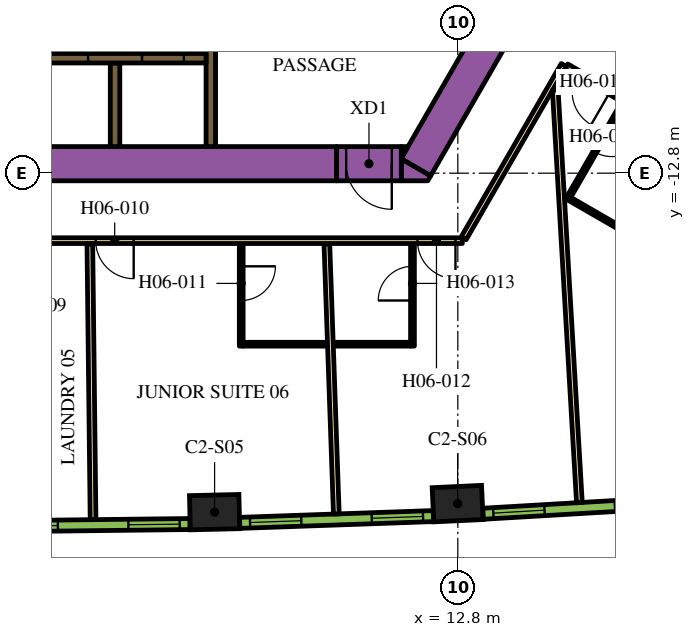
"""IFC4 building model, lengths in metres.
Left out: names, types, materials, properties, quantities, classifications, styles, units other than length and angle.
Written with IfcOpenShell. Run it as: python <this file> out.ifc"""

import sys

from ifc_helpers import new_model, si_unit, direction, frame, frame_2d, origin, origin_2d, place, context, subcontext, project, spatial, polyline, rectangle, outline, extrude, element, fill, save


model = new_model("IFC4")
c1 = context("Model", 3, precision=1e-05, world=origin(), true_north=direction((0.0, 1.0)))
c2 = subcontext(c1, "Body", "Model", "MODEL_VIEW")
j1 = project(units=[si_unit("LENGTHUNIT", "METRE"), si_unit("PLANEANGLEUNIT", "RADIAN")], contexts=[c1])
p1 = place(None, origin())
s1 = spatial("IfcSite", under=j1, at=p1, CompositionType="ELEMENT")
p2 = place(p1, origin())
s2 = spatial("IfcBuilding", under=s1, at=p2, CompositionType="ELEMENT")
p3 = place(p2, frame((0.0, 0.0, 87.6)))
s3 = spatial("IfcBuildingStorey", under=s2, at=p3, CompositionType="ELEMENT", Elevation=87.6)
for number, where, z_axis, x_axis in (
    (1, (6.399, -21.719, 0.0), (0.0, 0.0, 1.0), (1.0, 0.023, 0.0)),
    (2, (12.795, -21.494, 0.0), (0.0, 0.0, 1.0), (0.999, 0.047, 0.0)),
):
    element("IfcColumn", number, at=place(p3, frame(where, z_axis=z_axis, x_axis=x_axis)), inside=s3, PredefinedType="COLUMN", context=c2, shape_type="SweptSolid", body=[
        extrude(rectangle(XDim=1.3, YDim=0.9, at=origin_2d()), origin(), (0.0, 0.0, 1.0), 3.9),
    ])
p4 = place(p3, frame((11.695, -12.644, 0.0), z_axis=(0.0, 0.0, 1.0), x_axis=(0.500010229568, 0.86601949766, 0.0)))
e3 = element("IfcWall", 3, at=p4, inside=s3, PredefinedType="SOLIDWALL", context=c2, shape_type="SweptSolid", body=[
    extrude(rectangle(XDim=9.326, YDim=0.9, at=frame_2d((4.663, 0.0))), origin(), (0.0, 0.0, 1.0), 3.9),
])
p5 = place(p3, origin())
e4 = element("IfcWall", 4, at=p5, inside=s3, PredefinedType="SOLIDWALL", context=c2, shape_type="SweptSolid", body=[
    extrude(outline(polyline([(12.009, -13.0), (11.312, -13.0), (11.312, -12.425), (12.083, -12.871), (12.009, -13.0)])), origin(), (0.0, 0.0, 1.0), 3.9),
])
e5 = element("IfcWall", 5, at=p5, inside=s3, PredefinedType="SOLIDWALL", context=c2, shape_type="SweptSolid", body=[
    extrude(outline(polyline([(11.489, -12.1), (11.312, -12.407), (11.312, -12.1), (11.489, -12.1)])), origin(), (0.0, 0.0, 1.0), 3.9),
])
p6 = place(p3, frame((-12.019, -12.55, 0.0), z_axis=(0.0, 0.0, 1.0), x_axis=(1.0, 0.0, 0.0)))
e6 = element("IfcWall", 6, at=p6, inside=s3, PredefinedType="SOLIDWALL", context=c2, shape_type="SweptSolid", body=[
    extrude(rectangle(XDim=21.63, YDim=0.9, at=frame_2d((10.815, 0.0))), origin(), (0.0, 0.0, 1.0), 3.9),
])
p7 = place(p3, frame((6.3, -8.67, 0.0), z_axis=(0.0, 0.0, 1.0), x_axis=(0.0, -1.0, 0.0)))
e7 = element("IfcWall", 7, at=p7, inside=s3, PredefinedType="SOLIDWALL", context=c2, shape_type="SweptSolid", body=[
    extrude(rectangle(XDim=3.43, YDim=0.25, at=frame_2d((1.715, 0.0))), origin(), (0.0, 0.0, 1.0), 3.9),
])
p8 = place(p3, frame((3.78, -12.1, 0.0), z_axis=(0.0, 0.0, 1.0), x_axis=(0.0, 1.0, 0.0)))
e8 = element("IfcWall", 8, at=p8, inside=s3, PredefinedType="SOLIDWALL", context=c2, shape_type="SweptSolid", body=[
    extrude(rectangle(XDim=2.2, YDim=0.25, at=frame_2d((1.1, 0.0))), origin(), (0.0, 0.0, 1.0), 3.9),
])
p9 = place(p3, frame((-6.175, -9.775, 0.0), z_axis=(0.0, 0.0, 1.0), x_axis=(1.0, 0.0, 0.0)))
e9 = element("IfcWall", 9, at=p9, inside=s3, PredefinedType="SOLIDWALL", context=c2, shape_type="SweptSolid", body=[
    extrude(rectangle(XDim=12.35, YDim=0.25, at=frame_2d((6.175, 0.0))), origin(), (0.0, 0.0, 1.0), 3.9),
])
p10 = place(p9, frame((0.585, 0.0, 0.0)))
e10 = element("IfcOpeningElement", 10, at=p10, cuts=e9, PredefinedType="OPENING", context=c2, shape_type="SweptSolid", body=[
    extrude(rectangle(XDim=1.1, YDim=2.1, at=frame_2d((0.55, 1.05))), frame((0.0, 0.135, 0.0), z_axis=(0.0, -1.0, 0.0), x_axis=(1.0, 0.0, 0.0)), (0.0, 0.0, 1.0), 0.27),
])
p11 = place(p9, frame((3.105, 0.0, 0.0)))
e11 = element("IfcOpeningElement", 11, at=p11, cuts=e9, PredefinedType="OPENING", context=c2, shape_type="SweptSolid", body=[
    extrude(rectangle(XDim=1.1, YDim=2.1, at=frame_2d((0.55, 1.05))), frame((0.0, 0.135, 0.0), z_axis=(0.0, -1.0, 0.0), x_axis=(1.0, 0.0, 0.0)), (0.0, 0.0, 1.0), 0.27),
])
p12 = place(p9, frame((5.625, 0.0, 0.0)))
e12 = element("IfcOpeningElement", 12, at=p12, cuts=e9, PredefinedType="OPENING", context=c2, shape_type="SweptSolid", body=[
    extrude(rectangle(XDim=1.1, YDim=2.1, at=frame_2d((0.55, 1.05))), frame((0.0, 0.135, 0.0), z_axis=(0.0, -1.0, 0.0), x_axis=(1.0, 0.0, 0.0)), (0.0, 0.0, 1.0), 0.27),
])
p13 = place(p9, frame((8.145, 0.0, 0.0)))
e13 = element("IfcOpeningElement", 13, at=p13, cuts=e9, PredefinedType="OPENING", context=c2, shape_type="SweptSolid", body=[
    extrude(rectangle(XDim=1.1, YDim=2.1, at=frame_2d((0.55, 1.05))), frame((0.0, 0.135, 0.0), z_axis=(0.0, -1.0, 0.0), x_axis=(1.0, 0.0, 0.0)), (0.0, 0.0, 1.0), 0.27),
])
p14 = place(p9, frame((10.665, 0.0, 0.0)))
e14 = element("IfcOpeningElement", 14, at=p14, cuts=e9, PredefinedType="OPENING", context=c2, shape_type="SweptSolid", body=[
    extrude(rectangle(XDim=1.1, YDim=2.1, at=frame_2d((0.55, 1.05))), frame((0.0, 0.135, 0.0), z_axis=(0.0, -1.0, 0.0), x_axis=(1.0, 0.0, 0.0)), (0.0, 0.0, 1.0), 0.27),
])
p15 = place(p3, frame((11.312, -12.55, 0.0), z_axis=(0.0, 0.0, 1.0), x_axis=(-1.0, 0.0, 0.0)))
e15 = element("IfcWall", 15, at=p15, inside=s3, PredefinedType="SOLIDWALL", context=c2, shape_type="SweptSolid", body=[
    extrude(rectangle(XDim=1.7, YDim=0.9, at=frame_2d((0.85, 0.0))), origin(), (0.0, 0.0, 1.0), 3.9),
])
p16 = place(p15, frame((0.25, 0.0, 0.0)))
e16 = element("IfcOpeningElement", 16, at=p16, cuts=e15, PredefinedType="OPENING", context=c2, shape_type="SweptSolid", body=[
    extrude(rectangle(XDim=1.2, YDim=2.1, at=frame_2d((0.6, 1.05))), frame((0.0, 0.46, 0.0), z_axis=(0.0, -1.0, 0.0), x_axis=(1.0, 0.0, 0.0)), (0.0, 0.0, 1.0), 0.92),
])
p17 = place(p3, frame((16.412, -8.523, 0.0), z_axis=(0.0, 0.0, 1.0), x_axis=(0.866025629663, -0.499999608766, 0.0)))
e17 = element("IfcWall", 17, at=p17, inside=s3, PredefinedType="PARTITIONING", context=c2, shape_type="SweptSolid", body=[
    extrude(rectangle(XDim=13.624, YDim=0.15, at=frame_2d((6.812, 0.0))), origin(), (0.0, 0.0, 1.0), 2.75),
])
p18 = place(p17, frame((4.134, 0.0, 0.0)))
e18 = element("IfcOpeningElement", 18, at=p18, cuts=e17, PredefinedType="OPENING", context=c2, shape_type="SweptSolid", body=[
    extrude(rectangle(XDim=1.0, YDim=2.1, at=frame_2d((0.5, 1.05))), frame((0.0, 0.085, 0.0), z_axis=(0.0, -1.0, 0.0), x_axis=(1.0, 0.0, 0.0)), (0.0, 0.0, 1.0), 0.17),
])
p19 = place(p3, frame((12.918, -14.575, 0.0), z_axis=(0.0, 0.0, 1.0), x_axis=(-1.0, 0.0, 0.0)))
e19 = element("IfcWall", 19, at=p19, inside=s3, PredefinedType="PARTITIONING", context=c2, shape_type="SweptSolid", body=[
    extrude(rectangle(XDim=25.766, YDim=0.15, at=frame_2d((12.883, 0.0))), origin(), (0.0, 0.0, 1.0), 2.75),
])
p20 = place(p19, frame((19.306, 0.0, 0.0)))
e20 = element("IfcOpeningElement", 20, at=p20, cuts=e19, PredefinedType="OPENING", context=c2, shape_type="SweptSolid", body=[
    extrude(rectangle(XDim=1.0, YDim=2.1, at=frame_2d((0.5, 1.05))), frame((0.0, 0.085, 0.0), z_axis=(0.0, -1.0, 0.0), x_axis=(1.0, 0.0, 0.0)), (0.0, 0.0, 1.0), 0.17),
])
p21 = place(p19, frame((17.999, 0.0, 0.0)))
e21 = element("IfcOpeningElement", 21, at=p21, cuts=e19, PredefinedType="OPENING", context=c2, shape_type="SweptSolid", body=[
    extrude(rectangle(XDim=1.0, YDim=2.1, at=frame_2d((0.5, 1.05))), frame((0.0, 0.085, 0.0), z_axis=(0.0, -1.0, 0.0), x_axis=(1.0, 0.0, 0.0)), (0.0, 0.0, 1.0), 0.17),
])
p22 = place(p19, frame((10.874, 0.0, 0.0)))
e22 = element("IfcOpeningElement", 22, at=p22, cuts=e19, PredefinedType="OPENING", context=c2, shape_type="SweptSolid", body=[
    extrude(rectangle(XDim=0.9, YDim=2.1, at=frame_2d((0.45, 1.05))), frame((0.0, 0.085, 0.0), z_axis=(0.0, -1.0, 0.0), x_axis=(1.0, 0.0, 0.0)), (0.0, 0.0, 1.0), 0.17),
])
p23 = place(p19, frame((8.647, 0.0, 0.0)))
e23 = element("IfcOpeningElement", 23, at=p23, cuts=e19, PredefinedType="OPENING", context=c2, shape_type="SweptSolid", body=[
    extrude(rectangle(XDim=1.0, YDim=2.1, at=frame_2d((0.5, 1.05))), frame((0.0, 0.085, 0.0), z_axis=(0.0, -1.0, 0.0), x_axis=(1.0, 0.0, 0.0)), (0.0, 0.0, 1.0), 0.17),
])
p24 = place(p19, frame((0.18, 0.0, 0.0)))
e24 = element("IfcOpeningElement", 24, at=p24, cuts=e19, PredefinedType="OPENING", context=c2, shape_type="SweptSolid", body=[
    extrude(rectangle(XDim=1.0, YDim=2.1, at=frame_2d((0.5, 1.05))), frame((0.0, 0.085, 0.0), z_axis=(0.0, -1.0, 0.0), x_axis=(1.0, 0.0, 0.0)), (0.0, 0.0, 1.0), 0.17),
])
p25 = place(p3, frame((15.587, -9.952, 0.0), z_axis=(0.0, 0.0, 1.0), x_axis=(-0.500016618951, -0.866015808616, 0.0)))
e25 = element("IfcWall", 25, at=p25, inside=s3, PredefinedType="PARTITIONING", context=c2, shape_type="SweptSolid", body=[
    extrude(rectangle(XDim=5.268, YDim=0.15, at=frame_2d((2.634, 0.0))), origin(), (0.0, 0.0, 1.0), 2.75),
])
p26 = place(p3, frame((27.386, -16.764, 0.0), z_axis=(0.0, 0.0, 1.0), x_axis=(-0.866022585856, 0.500004880763, 0.0)))
e26 = element("IfcWall", 26, at=p26, inside=s3, PredefinedType="PARTITIONING", context=c2, shape_type="SweptSolid", body=[
    extrude(rectangle(XDim=13.544, YDim=0.15, at=frame_2d((6.772, 0.0))), origin(), (0.0, 0.0, 1.0), 2.75),
])
p27 = place(p26, frame((12.214, 0.0, 0.0)))
e27 = element("IfcOpeningElement", 27, at=p27, cuts=e26, PredefinedType="OPENING", context=c2, shape_type="SweptSolid", body=[
    extrude(rectangle(XDim=1.0, YDim=2.1, at=frame_2d((0.5, 1.05))), frame((0.0, 0.085, 0.0), z_axis=(0.0, -1.0, 0.0), x_axis=(1.0, 0.0, 0.0)), (0.0, 0.0, 1.0), 0.17),
])
p28 = place(p26, frame((8.49, 0.0, 0.0)))
e28 = element("IfcOpeningElement", 28, at=p28, cuts=e26, PredefinedType="OPENING", context=c2, shape_type="SweptSolid", body=[
    extrude(rectangle(XDim=1.0, YDim=2.1, at=frame_2d((0.5, 1.05))), frame((0.0, 0.085, 0.0), z_axis=(0.0, -1.0, 0.0), x_axis=(1.0, 0.0, 0.0)), (0.0, 0.0, 1.0), 0.17),
])
p29 = place(p3, frame((3.202, -21.916, 0.0), z_axis=(0.0, 0.0, 1.0), x_axis=(-0.011707696285, 0.999931462575, 0.0)))
e29 = element("IfcWall", 29, at=p29, inside=s3, PredefinedType="PARTITIONING", context=c2, shape_type="SweptSolid", body=[
    extrude(rectangle(XDim=7.257, YDim=0.15, at=frame_2d((3.628, 0.0))), origin(), (0.0, 0.0, 1.0), 2.75),
])
p30 = place(p3, frame((9.603, -21.767, 0.0), z_axis=(0.0, 0.0, 1.0), x_axis=(-0.035053506859, 0.999385436985, 0.0)))
e30 = element("IfcWall", 30, at=p30, inside=s3, PredefinedType="PARTITIONING", context=c2, shape_type="SweptSolid", body=[
    extrude(rectangle(XDim=7.111, YDim=0.15, at=frame_2d((3.556, 0.0))), origin(), (0.0, 0.0, 1.0), 2.75),
])
p31 = place(p3, frame((15.999, -21.467, 0.0), z_axis=(0.0, 0.0, 1.0), x_axis=(-0.058433825336, 0.998291284173, 0.0)))
e31 = element("IfcWall", 31, at=p31, inside=s3, PredefinedType="PARTITIONING", context=c2, shape_type="SweptSolid", body=[
    extrude(rectangle(XDim=10.875, YDim=0.15, at=frame_2d((5.438, 0.0))), origin(), (0.0, 0.0, 1.0), 2.75),
])
p32 = place(p3, frame((7.1, -14.65, 0.0), z_axis=(0.0, 0.0, 1.0), x_axis=(0.0, -1.0, 0.0)))
e32 = element("IfcWall", 32, at=p32, inside=s3, PredefinedType="PARTITIONING", context=c2, shape_type="SweptSolid", body=[
    extrude(rectangle(XDim=2.7, YDim=0.1, at=frame_2d((1.35, 0.0))), origin(), (0.0, 0.0, 1.0), 2.75),
])
p33 = place(p32, frame((0.6, 0.0, 0.0)))
e33 = element("IfcOpeningElement", 33, at=p33, cuts=e32, PredefinedType="OPENING", context=c2, shape_type="SweptSolid", body=[
    extrude(rectangle(XDim=0.9, YDim=2.1, at=frame_2d((0.45, 1.05))), frame((0.0, 0.06, 0.0), z_axis=(0.0, -1.0, 0.0), x_axis=(1.0, 0.0, 0.0)), (0.0, 0.0, 1.0), 0.12),
])
p34 = place(p3, frame((7.15, -17.3, 0.0), z_axis=(0.0, 0.0, 1.0), x_axis=(1.0, 0.0, 0.0)))
e34 = element("IfcWall", 34, at=p34, inside=s3, PredefinedType="PARTITIONING", context=c2, shape_type="SweptSolid", body=[
    extrude(rectangle(XDim=2.22, YDim=0.1, at=frame_2d((1.11, 0.0))), origin(), (0.0, 0.0, 1.0), 2.75),
])
p35 = place(p3, frame((11.607, -17.35, 0.0), z_axis=(0.0, 0.0, 1.0), x_axis=(0.0, 1.0, 0.0)))
e35 = element("IfcWall", 35, at=p35, inside=s3, PredefinedType="PARTITIONING", context=c2, shape_type="SweptSolid", body=[
    extrude(rectangle(XDim=2.7, YDim=0.1, at=frame_2d((1.35, 0.0))), origin(), (0.0, 0.0, 1.0), 2.75),
])
p36 = place(p35, frame((1.2, 0.0, 0.0)))
e36 = element("IfcOpeningElement", 36, at=p36, cuts=e35, PredefinedType="OPENING", context=c2, shape_type="SweptSolid", body=[
    extrude(rectangle(XDim=0.9, YDim=2.1, at=frame_2d((0.45, 1.05))), frame((0.0, 0.06, 0.0), z_axis=(0.0, -1.0, 0.0), x_axis=(1.0, 0.0, 0.0)), (0.0, 0.0, 1.0), 0.12),
])
p37 = place(p3, frame((11.557, -17.3, 0.0), z_axis=(0.0, 0.0, 1.0), x_axis=(-1.0, 0.0, 0.0)))
e37 = element("IfcWall", 37, at=p37, inside=s3, PredefinedType="PARTITIONING", context=c2, shape_type="SweptSolid", body=[
    extrude(rectangle(XDim=2.03, YDim=0.1, at=frame_2d((1.015, 0.0))), origin(), (0.0, 0.0, 1.0), 2.75),
])
p38 = place(p3, frame((17.155, -10.944, 0.0), z_axis=(0.0, 0.0, 1.0), x_axis=(-0.499939757307, -0.866060182126, 0.0)))
e38 = element("IfcWall", 38, at=p38, inside=s3, PredefinedType="PARTITIONING", context=c2, shape_type="SweptSolid", body=[
    extrude(rectangle(XDim=2.95, YDim=0.1, at=frame_2d((1.475, 0.0))), origin(), (0.0, 0.0, 1.0), 2.75),
])
p39 = place(p38, frame((0.6, 0.0, 0.0)))
e39 = element("IfcOpeningElement", 39, at=p39, cuts=e38, PredefinedType="OPENING", context=c2, shape_type="SweptSolid", body=[
    extrude(rectangle(XDim=0.9, YDim=2.1, at=frame_2d((0.45, 1.05))), frame((0.0, 0.06, 0.0), z_axis=(0.0, -1.0, 0.0), x_axis=(1.0, 0.0, 0.0)), (0.0, 0.0, 1.0), 0.12),
])
p40 = place(p3, frame((15.748, -13.48, 0.0), z_axis=(0.0, 0.0, 1.0), x_axis=(0.866083307622, -0.499899694197, 0.0)))
e40 = element("IfcWall", 40, at=p40, inside=s3, PredefinedType="PARTITIONING", context=c2, shape_type="SweptSolid", body=[
    extrude(rectangle(XDim=1.55, YDim=0.1, at=frame_2d((0.775, 0.0))), origin(), (0.0, 0.0, 1.0), 2.75),
])
p41 = place(p3, frame((0.653, -22.091, 0.0), z_axis=(0.0, 0.0, 1.0), x_axis=(0.999931786565, 0.011679992145, 0.0)))
e41 = element("IfcWall", 41, at=p41, inside=s3, PredefinedType="SOLIDWALL", context=c2, shape_type="SweptSolid", body=[
    extrude(rectangle(XDim=5.1, YDim=0.29, at=frame_2d((2.55, 0.0))), origin(), (0.0, 0.0, 1.0), 3.65),
])
p42 = place(p41, frame((0.273, 0.0, 0.9)))
e42 = element("IfcOpeningElement", 42, at=p42, cuts=e41, PredefinedType="OPENING", context=c2, shape_type="SweptSolid", body=[
    extrude(rectangle(XDim=1.35, YDim=2.15, at=frame_2d((0.675, 1.075))), frame((0.0, 0.155, 0.0), z_axis=(0.0, -1.0, 0.0), x_axis=(1.0, 0.0, 0.0)), (0.0, 0.0, 1.0), 0.31),
])
p43 = place(p41, frame((3.478, 0.0, 0.9)))
e43 = element("IfcOpeningElement", 43, at=p43, cuts=e41, PredefinedType="OPENING", context=c2, shape_type="SweptSolid", body=[
    extrude(rectangle(XDim=1.35, YDim=2.15, at=frame_2d((0.675, 1.075))), frame((0.0, 0.155, 0.0), z_axis=(0.0, -1.0, 0.0), x_axis=(1.0, 0.0, 0.0)), (0.0, 0.0, 1.0), 0.31),
])
p44 = place(p3, frame((7.059, -22.001, 0.0), z_axis=(0.0, 0.0, 1.0), x_axis=(0.999385993957, 0.035037623812, 0.0)))
e44 = element("IfcWall", 44, at=p44, inside=s3, PredefinedType="SOLIDWALL", context=c2, shape_type="SweptSolid", body=[
    extrude(rectangle(XDim=5.101, YDim=0.29, at=frame_2d((2.55, 0.0))), origin(), (0.0, 0.0, 1.0), 3.65),
])
p45 = place(p44, frame((0.273, 0.0, 0.9)))
e45 = element("IfcOpeningElement", 45, at=p45, cuts=e44, PredefinedType="OPENING", context=c2, shape_type="SweptSolid", body=[
    extrude(rectangle(XDim=1.35, YDim=2.15, at=frame_2d((0.675, 1.075))), frame((0.0, 0.155, 0.0), z_axis=(0.0, -1.0, 0.0), x_axis=(1.0, 0.0, 0.0)), (0.0, 0.0, 1.0), 0.31),
])
p46 = place(p44, frame((3.478, 0.0, 0.9)))
e46 = element("IfcOpeningElement", 46, at=p46, cuts=e44, PredefinedType="OPENING", context=c2, shape_type="SweptSolid", body=[
    extrude(rectangle(XDim=1.35, YDim=2.15, at=frame_2d((0.675, 1.075))), frame((0.0, 0.155, 0.0), z_axis=(0.0, -1.0, 0.0), x_axis=(1.0, 0.0, 0.0)), (0.0, 0.0, 1.0), 0.31),
])
p47 = place(p3, frame((13.462, -21.761, 0.0), z_axis=(0.0, 0.0, 1.0), x_axis=(0.998290511436, 0.058447025388, 0.0)))
e47 = element("IfcWall", 47, at=p47, inside=s3, PredefinedType="SOLIDWALL", context=c2, shape_type="SweptSolid", body=[
    extrude(rectangle(XDim=5.1, YDim=0.29, at=frame_2d((2.55, 0.0))), origin(), (0.0, 0.0, 1.0), 3.65),
])
p48 = place(p47, frame((0.272, 0.0, 0.9)))
e48 = element("IfcOpeningElement", 48, at=p48, cuts=e47, PredefinedType="OPENING", context=c2, shape_type="SweptSolid", body=[
    extrude(rectangle(XDim=1.35, YDim=2.15, at=frame_2d((0.675, 1.075))), frame((0.0, 0.155, 0.0), z_axis=(0.0, -1.0, 0.0), x_axis=(1.0, 0.0, 0.0)), (0.0, 0.0, 1.0), 0.31),
])
p49 = place(p47, frame((3.478, 0.0, 0.9)))
e49 = element("IfcOpeningElement", 49, at=p49, cuts=e47, PredefinedType="OPENING", context=c2, shape_type="SweptSolid", body=[
    extrude(rectangle(XDim=1.35, YDim=2.15, at=frame_2d((0.675, 1.075))), frame((0.0, 0.155, 0.0), z_axis=(0.0, -1.0, 0.0), x_axis=(1.0, 0.0, 0.0)), (0.0, 0.0, 1.0), 0.31),
])
p50 = place(p13, origin())
e50 = element("IfcDoor", 50, at=p50, inside=s3, OperationType="DOUBLE_DOOR_SLIDING", PredefinedType="DOOR", context=c2, shape_type="SweptSolid", body=[
    extrude(rectangle(XDim=1.1, YDim=2.1, at=frame_2d((0.55, 1.05))), frame((0.0, 0.025, 0.0), z_axis=(0.0, -1.0, 0.0), x_axis=(1.0, 0.0, 0.0)), (0.0, 0.0, 1.0), 0.05),
])
fill(e13, e50)
p51 = place(p14, origin())
e51 = element("IfcDoor", 51, at=p51, inside=s3, OperationType="DOUBLE_DOOR_SLIDING", PredefinedType="DOOR", context=c2, shape_type="SweptSolid", body=[
    extrude(rectangle(XDim=1.1, YDim=2.1, at=frame_2d((0.55, 1.05))), frame((0.0, 0.025, 0.0), z_axis=(0.0, -1.0, 0.0), x_axis=(1.0, 0.0, 0.0)), (0.0, 0.0, 1.0), 0.05),
])
fill(e14, e51)
p52 = place(p16, origin())
e52 = element("IfcDoor", 52, at=p52, inside=s3, OperationType="SINGLE_SWING_LEFT", PredefinedType="DOOR", context=c2, shape_type="SweptSolid", body=[
    extrude(rectangle(XDim=1.2, YDim=2.1, at=frame_2d((0.6, 1.05))), frame((0.0, 0.025, 0.0), z_axis=(0.0, -1.0, 0.0), x_axis=(1.0, 0.0, 0.0)), (0.0, 0.0, 1.0), 0.05),
])
fill(e16, e52)
p53 = place(p23, origin())
e53 = element("IfcDoor", 53, at=p53, inside=s3, OperationType="SINGLE_SWING_RIGHT", PredefinedType="DOOR", context=c2, shape_type="SweptSolid", body=[
    extrude(rectangle(XDim=1.0, YDim=2.1, at=frame_2d((0.5, 1.05))), frame((0.0, 0.025, 0.0), z_axis=(0.0, -1.0, 0.0), x_axis=(1.0, 0.0, 0.0)), (0.0, 0.0, 1.0), 0.05),
])
fill(e23, e53)
p54 = place(p33, origin())
e54 = element("IfcDoor", 54, at=p54, inside=s3, OperationType="SINGLE_SWING_RIGHT", PredefinedType="DOOR", context=c2, shape_type="SweptSolid", body=[
    extrude(rectangle(XDim=0.9, YDim=2.1, at=frame_2d((0.45, 1.05))), frame((0.0, 0.025, 0.0), z_axis=(0.0, -1.0, 0.0), x_axis=(1.0, 0.0, 0.0)), (0.0, 0.0, 1.0), 0.05),
])
fill(e33, e54)
p55 = place(p24, origin())
e55 = element("IfcDoor", 55, at=p55, inside=s3, OperationType="SINGLE_SWING_LEFT", PredefinedType="DOOR", context=c2, shape_type="SweptSolid", body=[
    extrude(rectangle(XDim=1.0, YDim=2.1, at=frame_2d((0.5, 1.05))), frame((0.0, 0.025, 0.0), z_axis=(0.0, -1.0, 0.0), x_axis=(1.0, 0.0, 0.0)), (0.0, 0.0, 1.0), 0.05),
])
fill(e24, e55)
p56 = place(p36, origin())
e56 = element("IfcDoor", 56, at=p56, inside=s3, OperationType="SINGLE_SWING_LEFT", PredefinedType="DOOR", context=c2, shape_type="SweptSolid", body=[
    extrude(rectangle(XDim=0.9, YDim=2.1, at=frame_2d((0.45, 1.05))), frame((0.0, 0.025, 0.0), z_axis=(0.0, -1.0, 0.0), x_axis=(1.0, 0.0, 0.0)), (0.0, 0.0, 1.0), 0.05),
])
fill(e36, e56)
p57 = place(p27, origin())
e57 = element("IfcDoor", 57, at=p57, inside=s3, OperationType="SINGLE_SWING_RIGHT", PredefinedType="DOOR", context=c2, shape_type="SweptSolid", body=[
    extrude(rectangle(XDim=1.0, YDim=2.1, at=frame_2d((0.5, 1.05))), frame((0.0, 0.025, 0.0), z_axis=(0.0, -1.0, 0.0), x_axis=(1.0, 0.0, 0.0)), (0.0, 0.0, 1.0), 0.05),
])
fill(e27, e57)
p58 = place(p39, origin())
e58 = element("IfcDoor", 58, at=p58, inside=s3, OperationType="SINGLE_SWING_LEFT", PredefinedType="DOOR", context=c2, shape_type="SweptSolid", body=[
    extrude(rectangle(XDim=0.9, YDim=2.1, at=frame_2d((0.45, 1.05))), frame((0.0, 0.025, 0.0), z_axis=(0.0, -1.0, 0.0), x_axis=(1.0, 0.0, 0.0)), (0.0, 0.0, 1.0), 0.05),
])
fill(e39, e58)
p59 = place(p42, origin())
e59 = element("IfcWindow", 59, at=p59, inside=s3, PartitioningType="DOUBLE_PANEL_VERTICAL", PredefinedType="WINDOW", context=c2, shape_type="SweptSolid", body=[
    extrude(rectangle(XDim=1.35, YDim=2.15, at=frame_2d((0.675, 1.075))), frame((0.0, 0.015, 0.0), z_axis=(0.0, -1.0, 0.0), x_axis=(1.0, 0.0, 0.0)), (0.0, 0.0, 1.0), 0.06),
])
fill(e42, e59)
p60 = place(p43, origin())
e60 = element("IfcWindow", 60, at=p60, inside=s3, PartitioningType="DOUBLE_PANEL_VERTICAL", PredefinedType="WINDOW", context=c2, shape_type="SweptSolid", body=[
    extrude(rectangle(XDim=1.35, YDim=2.15, at=frame_2d((0.675, 1.075))), frame((0.0, 0.015, 0.0), z_axis=(0.0, -1.0, 0.0), x_axis=(1.0, 0.0, 0.0)), (0.0, 0.0, 1.0), 0.06),
])
fill(e43, e60)
p61 = place(p45, origin())
e61 = element("IfcWindow", 61, at=p61, inside=s3, PartitioningType="DOUBLE_PANEL_VERTICAL", PredefinedType="WINDOW", context=c2, shape_type="SweptSolid", body=[
    extrude(rectangle(XDim=1.35, YDim=2.15, at=frame_2d((0.675, 1.075))), frame((0.0, 0.015, 0.0), z_axis=(0.0, -1.0, 0.0), x_axis=(1.0, 0.0, 0.0)), (0.0, 0.0, 1.0), 0.06),
])
fill(e45, e61)
p62 = place(p46, origin())
e62 = element("IfcWindow", 62, at=p62, inside=s3, PartitioningType="DOUBLE_PANEL_VERTICAL", PredefinedType="WINDOW", context=c2, shape_type="SweptSolid", body=[
    extrude(rectangle(XDim=1.35, YDim=2.15, at=frame_2d((0.675, 1.075))), frame((0.0, 0.015, 0.0), z_axis=(0.0, -1.0, 0.0), x_axis=(1.0, 0.0, 0.0)), (0.0, 0.0, 1.0), 0.06),
])
fill(e46, e62)
p63 = place(p48, origin())
e63 = element("IfcWindow", 63, at=p63, inside=s3, PartitioningType="DOUBLE_PANEL_VERTICAL", PredefinedType="WINDOW", context=c2, shape_type="SweptSolid", body=[
    extrude(rectangle(XDim=1.35, YDim=2.15, at=frame_2d((0.675, 1.075))), frame((0.0, 0.015, 0.0), z_axis=(0.0, -1.0, 0.0), x_axis=(1.0, 0.0, 0.0)), (0.0, 0.0, 1.0), 0.06),
])
fill(e48, e63)
save(model, sys.argv[1])
